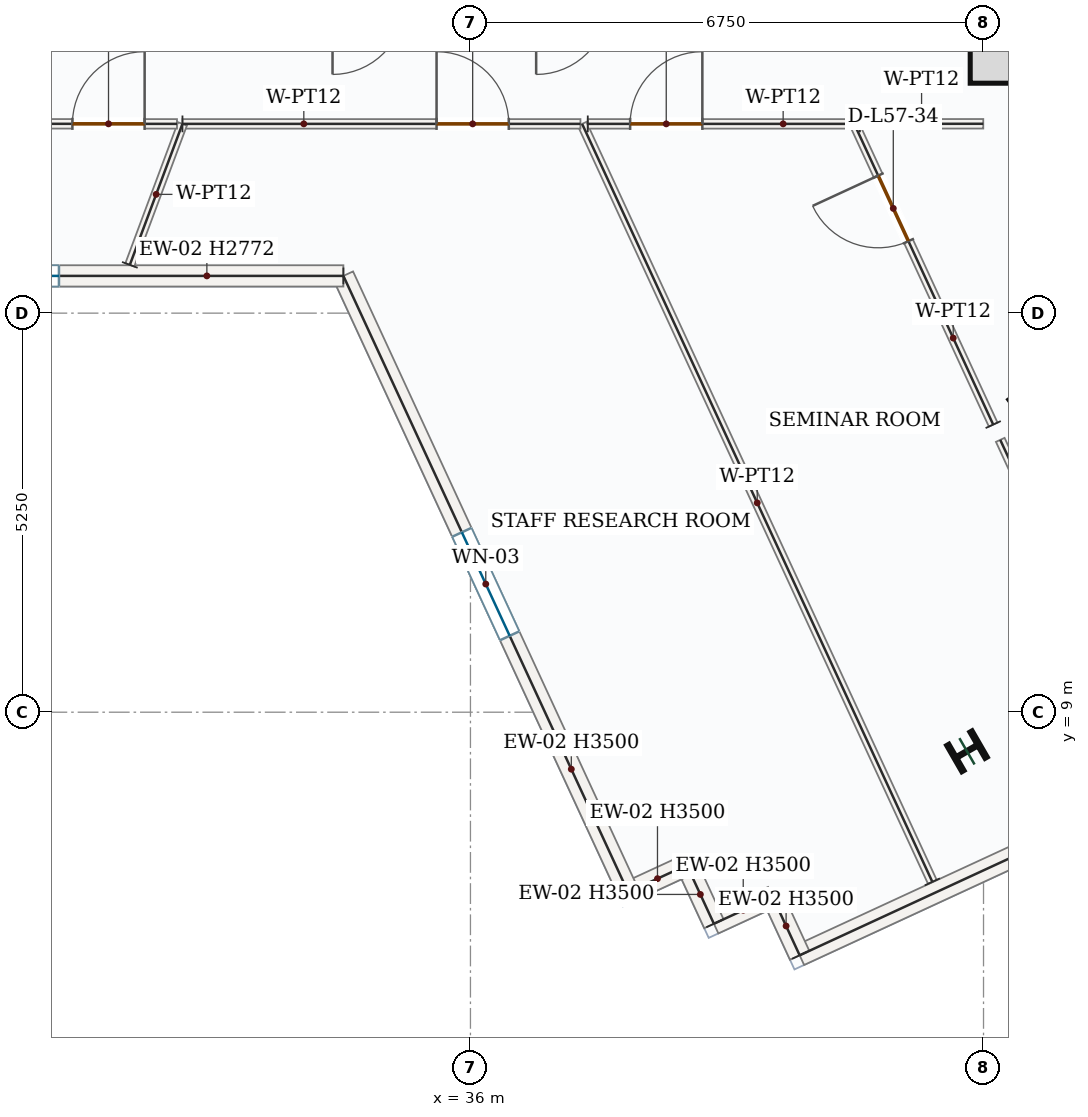
"""IFC4 building model, lengths in metres.
Left out: names, types, materials, properties, quantities, classifications, styles, units other than length and angle.
Written with IfcOpenShell. Run it as: python <this file> out.ifc"""

import sys

from ifc_helpers import new_model, si_unit, direction, frame, frame_2d, origin, origin_2d, place, context, subcontext, project, spatial, rectangle, i_section, extrude, source, transform, mapped, element, fill, save


model = new_model("IFC4")
c1 = context("Model", 3, precision=1e-05, world=origin(), true_north=direction((0.0, 1.0)))
c2 = subcontext(c1, "Body", "Model", "MODEL_VIEW")
j1 = project(units=[si_unit("LENGTHUNIT", "METRE"), si_unit("PLANEANGLEUNIT", "RADIAN")], contexts=[c1])
p1 = place(None, origin())
s1 = spatial("IfcSite", under=j1, at=p1, CompositionType="ELEMENT")
p2 = place(p1, origin())
s2 = spatial("IfcBuilding", under=s1, at=p2, CompositionType="ELEMENT")
p3 = place(p2, frame((0.0, 0.0, 242.85)))
s3 = spatial("IfcBuildingStorey", under=s2, at=p3, CompositionType="ELEMENT", Elevation=242.85)
p4 = place(p3, frame((42.975, 17.4, 0.0), z_axis=(0.0, 0.0, 1.0), x_axis=(0.0, 1.0, 0.0)))
e1 = element("IfcWall", 1, at=p4, inside=s3, PredefinedType="SHEAR", context=c2, shape_type="SweptSolid", body=[
    extrude(rectangle(XDim=8.55, YDim=0.45, at=frame_2d((4.275, 0.0))), origin(), (0.0, 0.0, 1.0), 3.5),
])
p5 = place(p4, frame((6.65, 0.0, 0.0)))
e2 = element("IfcOpeningElement", 2, at=p5, cuts=e1, PredefinedType="OPENING", context=c2, shape_type="SweptSolid", body=[
    extrude(rectangle(XDim=1.1, YDim=2.2, at=frame_2d((0.55, 1.1))), frame((0.0, 0.235, 0.0), z_axis=(0.0, -1.0, 0.0), x_axis=(1.0, 0.0, 0.0)), (0.0, 0.0, 1.0), 0.47),
])
p6 = place(p4, frame((1.75, 0.0, 0.0)))
e3 = element("IfcOpeningElement", 3, at=p6, cuts=e1, PredefinedType="OPENING", context=c2, shape_type="SweptSolid", body=[
    extrude(rectangle(XDim=1.3, YDim=2.2, at=frame_2d((0.65, 1.1))), frame((0.0, 0.235, 0.0), z_axis=(0.0, -1.0, 0.0), x_axis=(1.0, 0.0, 0.0)), (0.0, 0.0, 1.0), 0.47),
])
p7 = place(p4, frame((4.3, 0.0, 0.0)))
e4 = element("IfcOpeningElement", 4, at=p7, cuts=e1, PredefinedType="OPENING", context=c2, shape_type="SweptSolid", body=[
    extrude(rectangle(XDim=0.88, YDim=2.1, at=frame_2d((0.44, 1.05))), frame((0.0, 0.235, 0.0), z_axis=(0.0, -1.0, 0.0), x_axis=(1.0, 0.0, 0.0)), (0.0, 0.0, 1.0), 0.47),
])
m1 = source(origin(), c2, "Body", "SweptSolid", [
    extrude(rectangle(XDim=1.05, YDim=1.05, at=origin_2d()), origin(), (0.0, 0.0, 1.0), 3.75),
])
p8 = place(p3, frame((43.1, 17.8, 0.0), z_axis=(0.0, 0.0, 1.0), x_axis=(1.0, 0.0, 0.0)))
e5 = element("IfcColumn", 5, at=p8, inside=s3, PredefinedType="COLUMN", context=c2, shape_type="MappedRepresentation", body=[
    mapped(m1, transform((0.0, 0.0, 0.0), x_axis=(1.0, 0.0, 0.0), y_axis=(0.0, 1.0, 0.0), z_axis=(0.0, 0.0, 1.0), scale=1.0)),
])
m2 = source(origin(), c2, "Body", "SweptSolid", [
    extrude(i_section(OverallWidth=0.399, OverallDepth=0.386, WebThickness=0.021, FlangeThickness=0.033, FilletRadius=0.018, at=origin_2d()), origin(), (0.0, 0.0, 1.0), 3.75),
])
for number, where, z_axis, x_axis in (
    (6, (43.357, 13.063, 0.0), (0.0, 0.0, 1.0), (-0.588, 0.809, 0.0)),
    (7, (42.532, 8.486, 0.0), (0.0, 0.0, 1.0), (-0.5, 0.866, 0.0)),
):
    element("IfcColumn", number, at=place(p3, frame(where, z_axis=z_axis, x_axis=x_axis)), inside=s3, PredefinedType="COLUMN", context=c2, shape_type="MappedRepresentation", body=[
        mapped(m2, transform((0.0, 0.0, 0.0), x_axis=(1.0, 0.0, 0.0), y_axis=(0.0, 1.0, 0.0), z_axis=(0.0, 0.0, 1.0), scale=1.0)),
    ])
m3 = source(origin(), c2, "Body", "SweptSolid", [
    extrude(rectangle(XDim=9.92, YDim=0.28, at=frame_2d((4.96, 0.0))), origin(), (0.0, 0.0, 1.0), 3.5),
])
p9 = place(p3, frame((49.336, 9.963, 0.0), z_axis=(0.0, 0.0, 1.0), x_axis=(-0.907779940536, -0.419446754143, 0.0)))
e8 = element("IfcWall", 8, at=p9, inside=s3, PredefinedType="SOLIDWALL", context=c2, shape_type="MappedRepresentation", body=[
    mapped(m3, transform((0.0, 0.0, 0.0), x_axis=(1.0, 0.0, 0.0), y_axis=(0.0, 1.0, 0.0), z_axis=(0.0, 0.0, 1.0), scale=1.0)),
])
m4 = source(origin(), c2, "Body", "SweptSolid", [
    extrude(rectangle(XDim=0.85, YDim=0.28, at=frame_2d((0.425, 0.0))), origin(), (0.0, 0.0, 1.0), 3.5),
])
p10 = place(p3, frame((40.331, 5.802, 0.0), z_axis=(0.0, 0.0, 1.0), x_axis=(-0.419422493365, 0.907791150023, 0.0)))
e9 = element("IfcWall", 9, at=p10, inside=s3, PredefinedType="SOLIDWALL", context=c2, shape_type="MappedRepresentation", body=[
    mapped(m4, transform((0.0, 0.0, 0.0), x_axis=(1.0, 0.0, 0.0), y_axis=(0.0, 1.0, 0.0), z_axis=(0.0, 0.0, 1.0), scale=1.0)),
])
m5 = source(origin(), c2, "Body", "SweptSolid", [
    extrude(rectangle(XDim=0.85, YDim=0.28, at=frame_2d((0.425, 0.0))), origin(), (0.0, 0.0, 1.0), 3.5),
])
p11 = place(p3, frame((39.975, 6.573, 0.0), z_axis=(0.0, 0.0, 1.0), x_axis=(-0.907841666427, -0.419313139191, 0.0)))
e10 = element("IfcWall", 10, at=p11, inside=s3, PredefinedType="SOLIDWALL", context=c2, shape_type="MappedRepresentation", body=[
    mapped(m5, transform((0.0, 0.0, 0.0), x_axis=(1.0, 0.0, 0.0), y_axis=(0.0, 1.0, 0.0), z_axis=(0.0, 0.0, 1.0), scale=1.0)),
])
p12 = place(p3, frame((39.203, 6.217, 0.0), z_axis=(0.0, 0.0, 1.0), x_axis=(-0.419422493365, 0.907791150023, 0.0)))
e11 = element("IfcWall", 11, at=p12, inside=s3, PredefinedType="SOLIDWALL", context=c2, shape_type="MappedRepresentation", body=[
    mapped(m4, transform((0.0, 0.0, 0.0), x_axis=(1.0, 0.0, 0.0), y_axis=(0.0, 1.0, 0.0), z_axis=(0.0, 0.0, 1.0), scale=1.0)),
])
p13 = place(p3, frame((38.846, 6.988, 0.0), z_axis=(0.0, 0.0, 1.0), x_axis=(-0.907841666427, -0.419313139191, 0.0)))
e12 = element("IfcWall", 12, at=p13, inside=s3, PredefinedType="SOLIDWALL", context=c2, shape_type="MappedRepresentation", body=[
    mapped(m5, transform((0.0, 0.0, 0.0), x_axis=(1.0, 0.0, 0.0), y_axis=(0.0, 1.0, 0.0), z_axis=(0.0, 0.0, 1.0), scale=1.0)),
])
p14 = place(p3, frame((38.075, 6.632, 0.0), z_axis=(0.0, 0.0, 1.0), x_axis=(-0.419437747849, 0.90778410191, 0.0)))
e13 = element("IfcWall", 13, at=p14, inside=s3, PredefinedType="SOLIDWALL", context=c2, shape_type="SweptSolid", body=[
    extrude(rectangle(XDim=8.932, YDim=0.28, at=frame_2d((4.466, 0.0))), origin(), (0.0, 0.0, 1.0), 3.5),
])
p15 = place(p14, frame((3.716, 0.0, 0.85)))
e14 = element("IfcOpeningElement", 14, at=p15, cuts=e13, PredefinedType="OPENING", context=c2, shape_type="SweptSolid", body=[
    extrude(rectangle(XDim=1.5, YDim=1.5, at=frame_2d((0.75, 0.75))), frame((0.0, 0.15, 0.0), z_axis=(0.0, -1.0, 0.0), x_axis=(1.0, 0.0, 0.0)), (0.0, 0.0, 1.0), 0.3),
])
p16 = place(p3, frame((34.328, 14.74, 0.0), z_axis=(0.0, 0.0, 1.0), x_axis=(-1.0, 0.0, 0.0)))
e15 = element("IfcWall", 15, at=p16, inside=s3, PredefinedType="SOLIDWALL", context=c2, shape_type="SweptSolid", body=[
    extrude(rectangle(XDim=8.984, YDim=0.28, at=frame_2d((4.492, 0.0))), origin(), (0.0, 0.0, 1.0), 2.772),
])
p17 = place(p16, frame((3.742, 0.0, 0.85)))
e16 = element("IfcOpeningElement", 16, at=p17, cuts=e15, PredefinedType="OPENING", context=c2, shape_type="SweptSolid", body=[
    extrude(rectangle(XDim=1.5, YDim=1.5, at=frame_2d((0.75, 0.75))), frame((0.0, 0.15, 0.0), z_axis=(0.0, -1.0, 0.0), x_axis=(1.0, 0.0, 0.0)), (0.0, 0.0, 1.0), 0.3),
])
m6 = source(origin(), c2, "Body", "SweptSolid", [
    extrude(rectangle(XDim=4.904, YDim=0.125, at=frame_2d((2.452, 0.0))), origin(), (0.0, 0.0, 1.0), 3.5),
])
p18 = place(p3, frame((45.027, 8.131, 0.0), z_axis=(0.0, 0.0, 1.0), x_axis=(-0.419459107568, 0.907774232438, 0.0)))
e17 = element("IfcWall", 17, at=p18, inside=s3, PredefinedType="PARTITIONING", context=c2, shape_type="MappedRepresentation", body=[
    mapped(m6, transform((0.0, 0.0, 0.0), x_axis=(1.0, 0.0, 0.0), y_axis=(0.0, 1.0, 0.0), z_axis=(0.0, 0.0, 1.0), scale=1.0)),
])
p19 = place(p3, frame((42.877, 12.784, 0.0), z_axis=(0.0, 0.0, 1.0), x_axis=(-0.419416941906, 0.907793714917, 0.0)))
e18 = element("IfcWall", 18, at=p19, inside=s3, PredefinedType="PARTITIONING", context=c2, shape_type="SweptSolid", body=[
    extrude(rectangle(XDim=4.358, YDim=0.125, at=frame_2d((2.179, 0.0))), origin(), (0.0, 0.0, 1.0), 3.5),
])
p20 = place(p19, frame((2.658, 0.0, 0.0)))
e19 = element("IfcOpeningElement", 19, at=p20, cuts=e18, PredefinedType="OPENING", context=c2, shape_type="SweptSolid", body=[
    extrude(rectangle(XDim=0.95, YDim=2.15, at=frame_2d((0.475, 1.075))), frame((0.0, 0.073, 0.0), z_axis=(0.0, -1.0, 0.0), x_axis=(1.0, 0.0, 0.0)), (0.0, 0.0, 1.0), 0.145),
])
m7 = source(origin(), c2, "Body", "SweptSolid", [
    extrude(rectangle(XDim=1.623, YDim=0.125, at=frame_2d((0.812, 0.0))), origin(), (0.0, 0.0, 1.0), 3.5),
])
p21 = place(p3, frame((41.124, 16.74, 0.0), z_axis=(0.0, 0.0, 1.0), x_axis=(0.999999717168, 0.000752105684, 0.0)))
e20 = element("IfcWall", 20, at=p21, inside=s3, PredefinedType="PARTITIONING", context=c2, shape_type="MappedRepresentation", body=[
    mapped(m7, transform((0.0, 0.0, 0.0), x_axis=(1.0, 0.0, 0.0), y_axis=(0.0, 1.0, 0.0), z_axis=(0.0, 0.0, 1.0), scale=1.0)),
])
m8 = source(origin(), c2, "Body", "SweptSolid", [
    extrude(rectangle(XDim=10.985, YDim=0.125, at=frame_2d((5.492, 0.0))), origin(), (0.0, 0.0, 1.0), 3.5),
])
p22 = place(p3, frame((42.077, 6.768, 0.0), z_axis=(0.0, 0.0, 1.0), x_axis=(-0.41945135704, 0.907777813717, 0.0)))
e21 = element("IfcWall", 21, at=p22, inside=s3, PredefinedType="PARTITIONING", context=c2, shape_type="MappedRepresentation", body=[
    mapped(m8, transform((0.0, 0.0, 0.0), x_axis=(1.0, 0.0, 0.0), y_axis=(0.0, 1.0, 0.0), z_axis=(0.0, 0.0, 1.0), scale=1.0)),
])
p23 = place(p3, frame((37.543, 16.74, 0.0), z_axis=(0.0, 0.0, 1.0), x_axis=(1.0, 0.0, 0.0)))
e22 = element("IfcWall", 22, at=p23, inside=s3, PredefinedType="PARTITIONING", context=c2, shape_type="SweptSolid", body=[
    extrude(rectangle(XDim=3.484, YDim=0.125, at=frame_2d((1.742, 0.0))), origin(), (0.0, 0.0, 1.0), 3.5),
])
p24 = place(p23, frame((0.557, 0.0, 0.0)))
e23 = element("IfcOpeningElement", 23, at=p24, cuts=e22, PredefinedType="OPENING", context=c2, shape_type="SweptSolid", body=[
    extrude(rectangle(XDim=0.95, YDim=2.15, at=frame_2d((0.475, 1.075))), frame((0.0, 0.073, 0.0), z_axis=(0.0, -1.0, 0.0), x_axis=(1.0, 0.0, 0.0)), (0.0, 0.0, 1.0), 0.145),
])
p25 = place(p3, frame((32.211, 16.74, 0.0), z_axis=(0.0, 0.0, 1.0), x_axis=(1.0, 0.0, 0.0)))
e24 = element("IfcWall", 24, at=p25, inside=s3, PredefinedType="PARTITIONING", context=c2, shape_type="SweptSolid", body=[
    extrude(rectangle(XDim=5.236, YDim=0.125, at=frame_2d((2.618, 0.0))), origin(), (0.0, 0.0, 1.0), 3.5),
])
p26 = place(p25, frame((3.343, 0.0, 0.0)))
e25 = element("IfcOpeningElement", 25, at=p26, cuts=e24, PredefinedType="OPENING", context=c2, shape_type="SweptSolid", body=[
    extrude(rectangle(XDim=0.95, YDim=2.15, at=frame_2d((0.475, 1.075))), frame((0.0, 0.073, 0.0), z_axis=(0.0, -1.0, 0.0), x_axis=(1.0, 0.0, 0.0)), (0.0, 0.0, 1.0), 0.145),
])
m9 = source(origin(), c2, "Body", "SweptSolid", [
    extrude(rectangle(XDim=1.98, YDim=0.125, at=frame_2d((0.99, 0.0))), origin(), (0.0, 0.0, 1.0), 3.5),
])
p27 = place(p3, frame((31.519, 14.885, 0.0), z_axis=(0.0, 0.0, 1.0), x_axis=(0.349690675255, 0.9368652153, 0.0)))
e26 = element("IfcWall", 26, at=p27, inside=s3, PredefinedType="PARTITIONING", context=c2, shape_type="MappedRepresentation", body=[
    mapped(m9, transform((0.0, 0.0, 0.0), x_axis=(1.0, 0.0, 0.0), y_axis=(0.0, 1.0, 0.0), z_axis=(0.0, 0.0, 1.0), scale=1.0)),
])
p28 = place(p3, frame((29.253, 16.741, 0.0), z_axis=(0.0, 0.0, 1.0), x_axis=(0.999999910531, -0.000423011806, 0.0)))
e27 = element("IfcWall", 27, at=p28, inside=s3, PredefinedType="PARTITIONING", context=c2, shape_type="SweptSolid", body=[
    extrude(rectangle(XDim=2.886, YDim=0.125, at=frame_2d((1.443, 0.0))), origin(), (0.0, 0.0, 1.0), 3.5),
])
p29 = place(p28, frame((1.51, 0.0, 0.0)))
e28 = element("IfcOpeningElement", 28, at=p29, cuts=e27, PredefinedType="OPENING", context=c2, shape_type="SweptSolid", body=[
    extrude(rectangle(XDim=0.95, YDim=2.15, at=frame_2d((0.475, 1.075))), frame((0.0, 0.073, 0.0), z_axis=(0.0, -1.0, 0.0), x_axis=(1.0, 0.0, 0.0)), (0.0, 0.0, 1.0), 0.145),
])
m10 = source(origin(), c2, "Body", "SweptSolid", [
    extrude(rectangle(XDim=1.5, YDim=1.5, at=frame_2d((0.75, 0.75))), frame((0.0, 0.03, 0.0), z_axis=(0.0, -1.0, 0.0), x_axis=(1.0, 0.0, 0.0)), (0.0, 0.0, 1.0), 0.06),
])
p30 = place(p15, origin())
e29 = element("IfcWindow", 29, at=p30, inside=s3, PartitioningType="SINGLE_PANEL", PredefinedType="WINDOW", context=c2, shape_type="MappedRepresentation", body=[
    mapped(m10, transform((0.0, 0.0, 0.0), x_axis=(1.0, 0.0, 0.0), y_axis=(0.0, 1.0, 0.0), z_axis=(0.0, 0.0, 1.0), scale=1.0)),
])
fill(e14, e29)
p31 = place(p17, origin())
e30 = element("IfcWindow", 30, at=p31, inside=s3, PartitioningType="SINGLE_PANEL", PredefinedType="WINDOW", context=c2, shape_type="MappedRepresentation", body=[
    mapped(m10, transform((0.0, 0.0, 0.0), x_axis=(1.0, 0.0, 0.0), y_axis=(0.0, 1.0, 0.0), z_axis=(0.0, 0.0, 1.0), scale=1.0)),
])
fill(e16, e30)
m11 = source(origin(), c2, "Body", "SweptSolid", [
    extrude(rectangle(XDim=0.95, YDim=2.15, at=frame_2d((0.475, 1.075))), frame((0.0, 0.025, 0.0), z_axis=(0.0, -1.0, 0.0), x_axis=(1.0, 0.0, 0.0)), (0.0, 0.0, 1.0), 0.05),
])
p32 = place(p29, origin())
e31 = element("IfcDoor", 31, at=p32, inside=s3, OperationType="SINGLE_SWING_RIGHT", PredefinedType="DOOR", context=c2, shape_type="MappedRepresentation", body=[
    mapped(m11, transform((0.0, 0.0, 0.0), x_axis=(1.0, 0.0, 0.0), y_axis=(0.0, 1.0, 0.0), z_axis=(0.0, 0.0, 1.0), scale=1.0)),
])
fill(e28, e31)
p33 = place(p26, origin())
e32 = element("IfcDoor", 32, at=p33, inside=s3, OperationType="SINGLE_SWING_LEFT", PredefinedType="DOOR", context=c2, shape_type="MappedRepresentation", body=[
    mapped(m11, transform((0.0, 0.0, 0.0), x_axis=(1.0, 0.0, 0.0), y_axis=(0.0, 1.0, 0.0), z_axis=(0.0, 0.0, 1.0), scale=1.0)),
])
fill(e25, e32)
p34 = place(p24, origin())
e33 = element("IfcDoor", 33, at=p34, inside=s3, OperationType="SINGLE_SWING_RIGHT", PredefinedType="DOOR", context=c2, shape_type="MappedRepresentation", body=[
    mapped(m11, transform((0.0, 0.0, 0.0), x_axis=(1.0, 0.0, 0.0), y_axis=(0.0, 1.0, 0.0), z_axis=(0.0, 0.0, 1.0), scale=1.0)),
])
fill(e23, e33)
p35 = place(p20, origin())
e34 = element("IfcDoor", 34, at=p35, inside=s3, OperationType="SINGLE_SWING_RIGHT", PredefinedType="DOOR", context=c2, shape_type="MappedRepresentation", body=[
    mapped(m11, transform((0.0, 0.0, 0.0), x_axis=(1.0, 0.0, 0.0), y_axis=(0.0, 1.0, 0.0), z_axis=(0.0, 0.0, 1.0), scale=1.0)),
])
fill(e19, e34)
save(model, sys.argv[1])
